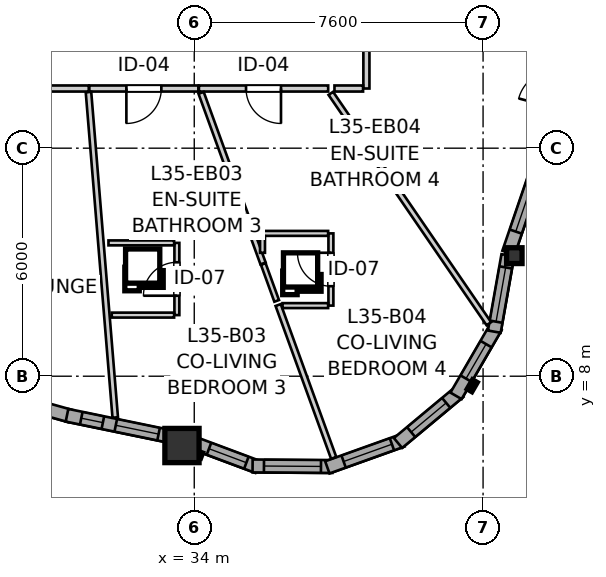
"""IFC4 building model, lengths in metres.
Left out: names, types, materials, properties, quantities, classifications, styles, units other than length and angle.
Written with IfcOpenShell. Run it as: python <this file> out.ifc"""

import sys

from ifc_helpers import new_model, si_unit, direction, frame, frame_2d, origin, origin_2d, place, context, subcontext, project, spatial, rectangle, i_section, extrude, source, transform, mapped, element, fill, save


model = new_model("IFC4")
c1 = context("Model", 3, precision=1e-05, world=origin(), true_north=direction((0.0, 1.0)))
c2 = subcontext(c1, "Body", "Model", "MODEL_VIEW")
j1 = project(units=[si_unit("LENGTHUNIT", "METRE"), si_unit("PLANEANGLEUNIT", "RADIAN")], contexts=[c1])
p1 = place(None, origin())
s1 = spatial("IfcSite", under=j1, at=p1, CompositionType="ELEMENT")
p2 = place(p1, origin())
s2 = spatial("IfcBuilding", under=s1, at=p2, CompositionType="ELEMENT")
p3 = place(p2, frame((0.0, 0.0, 118.4)))
s3 = spatial("IfcBuildingStorey", under=s2, at=p3, CompositionType="ELEMENT", Elevation=118.4)
m1 = source(origin(), c2, "Body", "SweptSolid", [
    extrude(rectangle(XDim=0.9, YDim=0.9, at=origin_2d()), origin(), (0.0, 0.0, 1.0), 2.95),
])
p4 = place(p3, frame((33.677, 6.176, 0.0), z_axis=(0.0, 0.0, 1.0), x_axis=(1.0, 0.0, 0.0)))
e1 = element("IfcColumn", 1, at=p4, inside=s3, PredefinedType="COLUMN", context=c2, shape_type="MappedRepresentation", body=[
    mapped(m1, transform((0.0, 0.0, 0.0), x_axis=(1.0, 0.0, 0.0), y_axis=(0.0, 1.0, 0.0), z_axis=(0.0, 0.0, 1.0), scale=1.0)),
])
m2 = source(origin(), c2, "Body", "SweptSolid", [
    extrude(i_section(OverallWidth=0.406, OverallDepth=0.416, WebThickness=0.027, FlangeThickness=0.044, FilletRadius=0.015, at=origin_2d()), origin(), (0.0, 0.0, 1.0), 2.95),
])
p5 = place(p3, frame((42.423, 11.172, 0.0), z_axis=(0.0, 0.0, 1.0), x_axis=(1.0, 0.0, 0.0)))
e2 = element("IfcColumn", 2, at=p5, inside=s3, PredefinedType="PILASTER", context=c2, shape_type="MappedRepresentation", body=[
    mapped(m2, transform((0.0, 0.0, 0.0), x_axis=(1.0, 0.0, 0.0), y_axis=(0.0, 1.0, 0.0), z_axis=(0.0, 0.0, 1.0), scale=1.0)),
])
p6 = place(p3, frame((27.811, 7.771, 0.0), z_axis=(0.0, 0.0, 1.0), x_axis=(0.963039905189, -0.269358758934, 0.0)))
e3 = element("IfcWall", 3, at=p6, inside=s3, PredefinedType="SOLIDWALL", context=c2, shape_type="SweptSolid", body=[
    extrude(rectangle(XDim=3.039, YDim=0.34, at=frame_2d((1.52, 0.0))), origin(), (0.0, 0.0, 1.0), 2.48),
])
p7 = place(p6, frame((0.935, 0.0, 0.82)))
e4 = element("IfcOpeningElement", 4, at=p7, cuts=e3, PredefinedType="OPENING", context=c2, shape_type="SweptSolid", body=[
    extrude(rectangle(XDim=1.15, YDim=1.2, at=frame_2d((0.575, 0.6))), frame((0.0, 0.18, 0.0), z_axis=(0.0, -1.0, 0.0), x_axis=(1.0, 0.0, 0.0)), (0.0, 0.0, 1.0), 0.36),
])
p8 = place(p3, frame((30.652, 6.973, 0.0), z_axis=(0.0, 0.0, 1.0), x_axis=(0.979418300652, -0.201841007595, 0.0)))
e5 = element("IfcWall", 5, at=p8, inside=s3, PredefinedType="SOLIDWALL", context=c2, shape_type="SweptSolid", body=[
    extrude(rectangle(XDim=2.893, YDim=0.34, at=frame_2d((1.447, 0.0))), origin(), (0.0, 0.0, 1.0), 2.48),
])
p9 = place(p8, frame((0.383, 0.0, 0.82)))
e6 = element("IfcOpeningElement", 6, at=p9, cuts=e5, PredefinedType="OPENING", context=c2, shape_type="SweptSolid", body=[
    extrude(rectangle(XDim=0.58, YDim=1.35, at=frame_2d((0.29, 0.675))), frame((0.0, 0.18, 0.0), z_axis=(0.0, -1.0, 0.0), x_axis=(1.0, 0.0, 0.0)), (0.0, 0.0, 1.0), 0.36),
])
p10 = place(p8, frame((1.31, 0.0, 0.82)))
e7 = element("IfcOpeningElement", 7, at=p10, cuts=e5, PredefinedType="OPENING", context=c2, shape_type="SweptSolid", body=[
    extrude(rectangle(XDim=1.15, YDim=1.2, at=frame_2d((0.575, 0.6))), frame((0.0, 0.18, 0.0), z_axis=(0.0, -1.0, 0.0), x_axis=(1.0, 0.0, 0.0)), (0.0, 0.0, 1.0), 0.36),
])
p11 = place(p3, frame((33.952, 6.255, 0.0), z_axis=(0.0, 0.0, 1.0), x_axis=(0.936799566991, -0.349866504951, 0.0)))
e8 = element("IfcWall", 8, at=p11, inside=s3, PredefinedType="SOLIDWALL", context=c2, shape_type="SweptSolid", body=[
    extrude(rectangle(XDim=1.831, YDim=0.34, at=frame_2d((0.916, 0.0))), origin(), (0.0, 0.0, 1.0), 2.48),
])
p12 = place(p11, frame((0.466, 0.0, 0.82)))
e9 = element("IfcOpeningElement", 9, at=p12, cuts=e8, PredefinedType="OPENING", context=c2, shape_type="SweptSolid", body=[
    extrude(rectangle(XDim=1.05, YDim=1.45, at=frame_2d((0.525, 0.725))), frame((0.0, 0.18, 0.0), z_axis=(0.0, -1.0, 0.0), x_axis=(1.0, 0.0, 0.0)), (0.0, 0.0, 1.0), 0.36),
])
p13 = place(p3, frame((35.535, 5.639, 0.0), z_axis=(0.0, 0.0, 1.0), x_axis=(0.999976456891, -0.00686189939, 0.0)))
e10 = element("IfcWall", 10, at=p13, inside=s3, PredefinedType="SOLIDWALL", context=c2, shape_type="SweptSolid", body=[
    extrude(rectangle(XDim=2.099, YDim=0.34, at=frame_2d((1.05, 0.0))), origin(), (0.0, 0.0, 1.0), 2.48),
])
p14 = place(p13, frame((0.3, 0.0, 0.82)))
e11 = element("IfcOpeningElement", 11, at=p14, cuts=e10, PredefinedType="OPENING", context=c2, shape_type="SweptSolid", body=[
    extrude(rectangle(XDim=1.5, YDim=1.45, at=frame_2d((0.75, 0.725))), frame((0.0, 0.18, 0.0), z_axis=(0.0, -1.0, 0.0), x_axis=(1.0, 0.0, 0.0)), (0.0, 0.0, 1.0), 0.36),
])
p15 = place(p3, frame((37.502, 5.602, 0.0), z_axis=(0.0, 0.0, 1.0), x_axis=(0.941523304278, 0.336947870598, 0.0)))
e12 = element("IfcWall", 12, at=p15, inside=s3, PredefinedType="SOLIDWALL", context=c2, shape_type="SweptSolid", body=[
    extrude(rectangle(XDim=2.099, YDim=0.34, at=frame_2d((1.05, 0.0))), origin(), (0.0, 0.0, 1.0), 2.48),
])
p16 = place(p15, frame((0.455, 0.0, 0.82)))
e13 = element("IfcOpeningElement", 13, at=p16, cuts=e12, PredefinedType="OPENING", context=c2, shape_type="SweptSolid", body=[
    extrude(rectangle(XDim=1.35, YDim=1.45, at=frame_2d((0.675, 0.725))), frame((0.0, 0.18, 0.0), z_axis=(0.0, -1.0, 0.0), x_axis=(1.0, 0.0, 0.0)), (0.0, 0.0, 1.0), 0.36),
])
p17 = place(p3, frame((39.362, 6.242, 0.0), z_axis=(0.0, 0.0, 1.0), x_axis=(0.768440501876, 0.639921241308, 0.0)))
e14 = element("IfcWall", 14, at=p17, inside=s3, PredefinedType="SOLIDWALL", context=c2, shape_type="SweptSolid", body=[
    extrude(rectangle(XDim=2.099, YDim=0.34, at=frame_2d((1.05, 0.0))), origin(), (0.0, 0.0, 1.0), 2.48),
])
p18 = place(p17, frame((0.449, 0.0, 0.82)))
e15 = element("IfcOpeningElement", 15, at=p18, cuts=e14, PredefinedType="OPENING", context=c2, shape_type="SweptSolid", body=[
    extrude(rectangle(XDim=1.2, YDim=1.45, at=frame_2d((0.6, 0.725))), frame((0.0, 0.18, 0.0), z_axis=(0.0, -1.0, 0.0), x_axis=(1.0, 0.0, 0.0)), (0.0, 0.0, 1.0), 0.36),
])
p19 = place(p3, frame((40.888, 7.483, 0.0), z_axis=(0.0, 0.0, 1.0), x_axis=(0.501902596059, 0.864924149315, 0.0)))
e16 = element("IfcWall", 16, at=p19, inside=s3, PredefinedType="SOLIDWALL", context=c2, shape_type="SweptSolid", body=[
    extrude(rectangle(XDim=2.099, YDim=0.34, at=frame_2d((1.049, 0.0))), origin(), (0.0, 0.0, 1.0), 2.48),
])
p20 = place(p19, frame((0.524, 0.0, 0.82)))
e17 = element("IfcOpeningElement", 17, at=p20, cuts=e16, PredefinedType="OPENING", context=c2, shape_type="SweptSolid", body=[
    extrude(rectangle(XDim=1.05, YDim=1.45, at=frame_2d((0.525, 0.725))), frame((0.0, 0.18, 0.0), z_axis=(0.0, -1.0, 0.0), x_axis=(1.0, 0.0, 0.0)), (0.0, 0.0, 1.0), 0.36),
])
p21 = place(p3, frame((41.896, 9.173, 0.0), z_axis=(0.0, 0.0, 1.0), x_axis=(0.174399433509, 0.984674990843, 0.0)))
e18 = element("IfcWall", 18, at=p21, inside=s3, PredefinedType="SOLIDWALL", context=c2, shape_type="SweptSolid", body=[
    extrude(rectangle(XDim=2.041, YDim=0.34, at=frame_2d((1.021, 0.0))), origin(), (0.0, 0.0, 1.0), 2.48),
])
p22 = place(p21, frame((0.267, 0.0, 0.82)))
e19 = element("IfcOpeningElement", 19, at=p22, cuts=e18, PredefinedType="OPENING", context=c2, shape_type="SweptSolid", body=[
    extrude(rectangle(XDim=1.45, YDim=1.25, at=frame_2d((0.725, 0.625))), frame((0.0, 0.18, 0.0), z_axis=(0.0, -1.0, 0.0), x_axis=(1.0, 0.0, 0.0)), (0.0, 0.0, 1.0), 0.36),
])
p23 = place(p3, frame((42.268, 11.246, 0.0), z_axis=(0.0, 0.0, 1.0), x_axis=(0.323583674973, 0.946199558915, 0.0)))
e20 = element("IfcWall", 20, at=p23, inside=s3, PredefinedType="SOLIDWALL", context=c2, shape_type="SweptSolid", body=[
    extrude(rectangle(XDim=3.152, YDim=0.34, at=frame_2d((1.576, 0.0))), origin(), (0.0, 0.0, 1.0), 2.48),
])
p24 = place(p23, frame((0.591, 0.0, 0.82)))
e21 = element("IfcOpeningElement", 21, at=p24, cuts=e20, PredefinedType="OPENING", context=c2, shape_type="SweptSolid", body=[
    extrude(rectangle(XDim=1.95, YDim=1.4, at=frame_2d((0.975, 0.7))), frame((0.0, 0.18, 0.0), z_axis=(0.0, -1.0, 0.0), x_axis=(1.0, 0.0, 0.0)), (0.0, 0.0, 1.0), 0.36),
])
p25 = place(p3, frame((38.53, 21.321, 0.0), z_axis=(0.0, 0.0, 1.0), x_axis=(0.0, -1.0, 0.0)))
e22 = element("IfcWall", 22, at=p25, inside=s3, PredefinedType="PARTITIONING", context=c2, shape_type="SweptSolid", body=[
    extrude(rectangle(XDim=5.751, YDim=0.16, at=frame_2d((2.875, 0.0))), origin(), (0.0, 0.0, 1.0), 2.95),
])
p26 = place(p25, frame((2.404, 0.0, 0.0)))
e23 = element("IfcOpeningElement", 23, at=p26, cuts=e22, PredefinedType="OPENING", context=c2, shape_type="SweptSolid", body=[
    extrude(rectangle(XDim=0.96, YDim=2.1, at=frame_2d((0.48, 1.05))), frame((0.0, 0.09, 0.0), z_axis=(0.0, -1.0, 0.0), x_axis=(1.0, 0.0, 0.0)), (0.0, 0.0, 1.0), 0.18),
])
p27 = place(p3, frame((31.224, 15.57, 0.0), z_axis=(0.0, 0.0, 1.0), x_axis=(-1.0, 0.0, 0.0)))
e24 = element("IfcWall", 24, at=p27, inside=s3, PredefinedType="PARTITIONING", context=c2, shape_type="SweptSolid", body=[
    extrude(rectangle(XDim=3.679, YDim=0.16, at=frame_2d((1.84, 0.0))), origin(), (0.0, 0.0, 1.0), 2.95),
])
p28 = place(p27, frame((1.212, 0.0, 0.0)))
e25 = element("IfcOpeningElement", 25, at=p28, cuts=e24, PredefinedType="OPENING", context=c2, shape_type="SweptSolid", body=[
    extrude(rectangle(XDim=1.3, YDim=2.1, at=frame_2d((0.65, 1.05))), frame((0.0, 0.09, 0.0), z_axis=(0.0, -1.0, 0.0), x_axis=(1.0, 0.0, 0.0)), (0.0, 0.0, 1.0), 0.18),
])
p29 = place(p3, frame((37.524, 15.57, 0.0), z_axis=(0.0, 0.0, 1.0), x_axis=(-1.0, 0.0, 0.0)))
e26 = element("IfcWall", 26, at=p29, inside=s3, PredefinedType="PARTITIONING", context=c2, shape_type="SweptSolid", body=[
    extrude(rectangle(XDim=3.401, YDim=0.16, at=frame_2d((1.7, 0.0))), origin(), (0.0, 0.0, 1.0), 2.95),
])
p30 = place(p29, frame((1.241, 0.0, 0.0)))
e27 = element("IfcOpeningElement", 27, at=p30, cuts=e26, PredefinedType="OPENING", context=c2, shape_type="SweptSolid", body=[
    extrude(rectangle(XDim=0.92, YDim=2.1, at=frame_2d((0.46, 1.05))), frame((0.0, 0.09, 0.0), z_axis=(0.0, -1.0, 0.0), x_axis=(1.0, 0.0, 0.0)), (0.0, 0.0, 1.0), 0.18),
])
p31 = place(p3, frame((34.108, 15.57, 0.0), z_axis=(0.0, 0.0, 1.0), x_axis=(-1.0, 0.0, 0.0)))
e28 = element("IfcWall", 28, at=p31, inside=s3, PredefinedType="PARTITIONING", context=c2, shape_type="SweptSolid", body=[
    extrude(rectangle(XDim=2.869, YDim=0.16, at=frame_2d((1.435, 0.0))), origin(), (0.0, 0.0, 1.0), 2.95),
])
p32 = place(p31, frame((0.974, 0.0, 0.0)))
e29 = element("IfcOpeningElement", 29, at=p32, cuts=e28, PredefinedType="OPENING", context=c2, shape_type="SweptSolid", body=[
    extrude(rectangle(XDim=0.92, YDim=2.1, at=frame_2d((0.46, 1.05))), frame((0.0, 0.09, 0.0), z_axis=(0.0, -1.0, 0.0), x_axis=(1.0, 0.0, 0.0)), (0.0, 0.0, 1.0), 0.18),
])
p33 = place(p3, frame((33.543, 9.608, 0.0), z_axis=(0.0, 0.0, 1.0), x_axis=(0.0, 1.0, 0.0)))
e30 = element("IfcWall", 30, at=p33, inside=s3, PredefinedType="PARTITIONING", context=c2, shape_type="SweptSolid", body=[
    extrude(rectangle(XDim=1.9, YDim=0.13, at=frame_2d((0.95, 0.0))), origin(), (0.0, 0.0, 1.0), 2.95),
])
p34 = place(p33, frame((0.51, 0.0, 0.0)))
e31 = element("IfcOpeningElement", 31, at=p34, cuts=e30, PredefinedType="OPENING", context=c2, shape_type="SweptSolid", body=[
    extrude(rectangle(XDim=0.88, YDim=2.05, at=frame_2d((0.44, 1.025))), frame((0.0, 0.075, 0.0), z_axis=(0.0, -1.0, 0.0), x_axis=(1.0, 0.0, 0.0)), (0.0, 0.0, 1.0), 0.15),
])
p35 = place(p3, frame((37.596, 9.858, 0.0), z_axis=(0.0, 0.0, 1.0), x_axis=(0.0, 1.0, 0.0)))
e32 = element("IfcWall", 32, at=p35, inside=s3, PredefinedType="PARTITIONING", context=c2, shape_type="SweptSolid", body=[
    extrude(rectangle(XDim=1.9, YDim=0.13, at=frame_2d((0.95, 0.0))), origin(), (0.0, 0.0, 1.0), 2.95),
])
p36 = place(p35, frame((0.51, 0.0, 0.0)))
e33 = element("IfcOpeningElement", 33, at=p36, cuts=e32, PredefinedType="OPENING", context=c2, shape_type="SweptSolid", body=[
    extrude(rectangle(XDim=0.88, YDim=2.05, at=frame_2d((0.44, 1.025))), frame((0.0, 0.075, 0.0), z_axis=(0.0, -1.0, 0.0), x_axis=(1.0, 0.0, 0.0)), (0.0, 0.0, 1.0), 0.15),
])
p37 = place(p3, frame((31.217, 15.476, 0.0), z_axis=(0.0, 0.0, 1.0), x_axis=(0.081928316893, -0.996638224679, 0.0)))
e34 = element("IfcWall", 34, at=p37, inside=s3, PredefinedType="PARTITIONING", context=c2, shape_type="SweptSolid", body=[
    extrude(rectangle(XDim=8.591, YDim=0.145, at=frame_2d((4.295, 0.0))), origin(), (0.0, 0.0, 1.0), 2.95),
])
p38 = place(p3, frame((37.594, 15.442, 0.0), z_axis=(0.0, 0.0, 1.0), x_axis=(0.565681325722, -0.824623937155, 0.0)))
e35 = element("IfcWall", 35, at=p38, inside=s3, PredefinedType="PARTITIONING", context=c2, shape_type="SweptSolid", body=[
    extrude(rectangle(XDim=7.35, YDim=0.145, at=frame_2d((3.675, 0.0))), origin(), (0.0, 0.0, 1.0), 2.95),
])
p39 = place(p3, frame((34.18, 15.458, 0.0), z_axis=(0.0, 0.0, 1.0), x_axis=(0.341373856507, -0.939927598325, 0.0)))
e36 = element("IfcWall", 36, at=p39, inside=s3, PredefinedType="PARTITIONING", context=c2, shape_type="SweptSolid", body=[
    extrude(rectangle(XDim=4.779, YDim=0.145, at=frame_2d((2.389, 0.0))), origin(), (0.0, 0.0, 1.0), 2.95),
])
p40 = place(p3, frame((36.208, 9.873, 0.0), z_axis=(0.0, 0.0, 1.0), x_axis=(0.341362804218, -0.939931612351, 0.0)))
e37 = element("IfcWall", 37, at=p40, inside=s3, PredefinedType="PARTITIONING", context=c2, shape_type="SweptSolid", body=[
    extrude(rectangle(XDim=4.279, YDim=0.145, at=frame_2d((2.14, 0.0))), origin(), (0.0, 0.0, 1.0), 2.95),
])
p41 = place(p3, frame((31.743, 11.508, 0.0), z_axis=(0.0, 0.0, 1.0), x_axis=(1.0, 0.0, 0.0)))
e38 = element("IfcWall", 38, at=p41, inside=s3, PredefinedType="PARTITIONING", context=c2, shape_type="SweptSolid", body=[
    extrude(rectangle(XDim=1.727, YDim=0.13, at=frame_2d((0.864, 0.0))), origin(), (0.0, 0.0, 1.0), 2.95),
])
p42 = place(p3, frame((31.829, 9.608, 0.0), z_axis=(0.0, 0.0, 1.0), x_axis=(1.0, 0.0, 0.0)))
e39 = element("IfcWall", 39, at=p42, inside=s3, PredefinedType="PARTITIONING", context=c2, shape_type="SweptSolid", body=[
    extrude(rectangle(XDim=1.641, YDim=0.13, at=frame_2d((0.82, 0.0))), origin(), (0.0, 0.0, 1.0), 2.558),
])
p43 = place(p3, frame((35.796, 11.758, 0.0), z_axis=(0.0, 0.0, 1.0), x_axis=(1.0, 0.0, 0.0)))
e40 = element("IfcWall", 40, at=p43, inside=s3, PredefinedType="PARTITIONING", context=c2, shape_type="SweptSolid", body=[
    extrude(rectangle(XDim=1.727, YDim=0.13, at=frame_2d((0.864, 0.0))), origin(), (0.0, 0.0, 1.0), 2.95),
])
p44 = place(p3, frame((36.323, 9.858, 0.0), z_axis=(0.0, 0.0, 1.0), x_axis=(1.0, 0.0, 0.0)))
e41 = element("IfcWall", 41, at=p44, inside=s3, PredefinedType="PARTITIONING", context=c2, shape_type="SweptSolid", body=[
    extrude(rectangle(XDim=1.2, YDim=0.13, at=frame_2d((0.6, 0.0))), origin(), (0.0, 0.0, 1.0), 2.95),
])
p45 = place(p3, frame((35.816, 10.952, 0.0), z_axis=(0.0, 0.0, 1.0), x_axis=(0.341515178303, -0.939876259403, 0.0)))
e42 = element("IfcWall", 42, at=p45, inside=s3, PredefinedType="PARTITIONING", context=c2, shape_type="SweptSolid", body=[
    extrude(rectangle(XDim=1.032, YDim=0.13, at=frame_2d((0.516, 0.0))), origin(), (0.0, 0.0, 1.0), 2.95),
])
p46 = place(p3, frame((37.69, 15.57, 0.0), z_axis=(0.0, 0.0, 1.0), x_axis=(1.0, 0.0, 0.0)))
e43 = element("IfcWall", 43, at=p46, inside=s3, PredefinedType="PARTITIONING", context=c2, shape_type="SweptSolid", body=[
    extrude(rectangle(XDim=0.752, YDim=0.16, at=frame_2d((0.376, 0.0))), origin(), (0.0, 0.0, 1.0), 2.95),
])
p47 = place(p3, frame((35.796, 11.247, 0.0), z_axis=(0.0, 0.0, 1.0), x_axis=(0.0, 1.0, 0.0)))
e44 = element("IfcWall", 44, at=p47, inside=s3, PredefinedType="PARTITIONING", context=c2, shape_type="SweptSolid", body=[
    extrude(rectangle(XDim=0.438, YDim=0.13, at=frame_2d((0.219, 0.0))), origin(), (0.0, 0.0, 1.0), 2.95),
])
m3 = source(origin(), c2, "Body", "SweptSolid", [
    extrude(rectangle(XDim=0.58, YDim=1.35, at=frame_2d((0.29, 0.675))), frame((0.0, 0.03, 0.0), z_axis=(0.0, -1.0, 0.0), x_axis=(1.0, 0.0, 0.0)), (0.0, 0.0, 1.0), 0.06),
])
p48 = place(p9, origin())
e45 = element("IfcWindow", 45, at=p48, inside=s3, PartitioningType="SINGLE_PANEL", PredefinedType="WINDOW", context=c2, shape_type="MappedRepresentation", body=[
    mapped(m3, transform((0.0, 0.0, 0.0), x_axis=(1.0, 0.0, 0.0), y_axis=(0.0, 1.0, 0.0), z_axis=(0.0, 0.0, 1.0), scale=1.0)),
])
fill(e6, e45)
m4 = source(origin(), c2, "Body", "SweptSolid", [
    extrude(rectangle(XDim=1.15, YDim=1.2, at=frame_2d((0.575, 0.6))), frame((0.0, 0.03, 0.0), z_axis=(0.0, -1.0, 0.0), x_axis=(1.0, 0.0, 0.0)), (0.0, 0.0, 1.0), 0.06),
])
p49 = place(p10, origin())
e46 = element("IfcWindow", 46, at=p49, inside=s3, PartitioningType="SINGLE_PANEL", PredefinedType="WINDOW", context=c2, shape_type="MappedRepresentation", body=[
    mapped(m4, transform((0.0, 0.0, 0.0), x_axis=(1.0, 0.0, 0.0), y_axis=(0.0, 1.0, 0.0), z_axis=(0.0, 0.0, 1.0), scale=1.0)),
])
fill(e7, e46)
m5 = source(origin(), c2, "Body", "SweptSolid", [
    extrude(rectangle(XDim=1.05, YDim=1.45, at=frame_2d((0.525, 0.725))), frame((0.0, 0.03, 0.0), z_axis=(0.0, -1.0, 0.0), x_axis=(1.0, 0.0, 0.0)), (0.0, 0.0, 1.0), 0.06),
])
p50 = place(p12, origin())
e47 = element("IfcWindow", 47, at=p50, inside=s3, PartitioningType="SINGLE_PANEL", PredefinedType="WINDOW", context=c2, shape_type="MappedRepresentation", body=[
    mapped(m5, transform((0.0, 0.0, 0.0), x_axis=(1.0, 0.0, 0.0), y_axis=(0.0, 1.0, 0.0), z_axis=(0.0, 0.0, 1.0), scale=1.0)),
])
fill(e9, e47)
m6 = source(origin(), c2, "Body", "SweptSolid", [
    extrude(rectangle(XDim=1.5, YDim=1.45, at=frame_2d((0.75, 0.725))), frame((0.0, 0.03, 0.0), z_axis=(0.0, -1.0, 0.0), x_axis=(1.0, 0.0, 0.0)), (0.0, 0.0, 1.0), 0.06),
])
p51 = place(p14, origin())
e48 = element("IfcWindow", 48, at=p51, inside=s3, PartitioningType="SINGLE_PANEL", PredefinedType="WINDOW", context=c2, shape_type="MappedRepresentation", body=[
    mapped(m6, transform((0.0, 0.0, 0.0), x_axis=(1.0, 0.0, 0.0), y_axis=(0.0, 1.0, 0.0), z_axis=(0.0, 0.0, 1.0), scale=1.0)),
])
fill(e11, e48)
m7 = source(origin(), c2, "Body", "SweptSolid", [
    extrude(rectangle(XDim=1.35, YDim=1.45, at=frame_2d((0.675, 0.725))), frame((0.0, 0.03, 0.0), z_axis=(0.0, -1.0, 0.0), x_axis=(1.0, 0.0, 0.0)), (0.0, 0.0, 1.0), 0.06),
])
p52 = place(p16, origin())
e49 = element("IfcWindow", 49, at=p52, inside=s3, PartitioningType="SINGLE_PANEL", PredefinedType="WINDOW", context=c2, shape_type="MappedRepresentation", body=[
    mapped(m7, transform((0.0, 0.0, 0.0), x_axis=(1.0, 0.0, 0.0), y_axis=(0.0, 1.0, 0.0), z_axis=(0.0, 0.0, 1.0), scale=1.0)),
])
fill(e13, e49)
m8 = source(origin(), c2, "Body", "SweptSolid", [
    extrude(rectangle(XDim=1.2, YDim=1.45, at=frame_2d((0.6, 0.725))), frame((0.0, 0.03, 0.0), z_axis=(0.0, -1.0, 0.0), x_axis=(1.0, 0.0, 0.0)), (0.0, 0.0, 1.0), 0.06),
])
p53 = place(p18, origin())
e50 = element("IfcWindow", 50, at=p53, inside=s3, PartitioningType="SINGLE_PANEL", PredefinedType="WINDOW", context=c2, shape_type="MappedRepresentation", body=[
    mapped(m8, transform((0.0, 0.0, 0.0), x_axis=(1.0, 0.0, 0.0), y_axis=(0.0, 1.0, 0.0), z_axis=(0.0, 0.0, 1.0), scale=1.0)),
])
fill(e15, e50)
p54 = place(p20, origin())
e51 = element("IfcWindow", 51, at=p54, inside=s3, PartitioningType="SINGLE_PANEL", PredefinedType="WINDOW", context=c2, shape_type="MappedRepresentation", body=[
    mapped(m5, transform((0.0, 0.0, 0.0), x_axis=(1.0, 0.0, 0.0), y_axis=(0.0, 1.0, 0.0), z_axis=(0.0, 0.0, 1.0), scale=1.0)),
])
fill(e17, e51)
m9 = source(origin(), c2, "Body", "SweptSolid", [
    extrude(rectangle(XDim=1.45, YDim=1.25, at=frame_2d((0.725, 0.625))), frame((0.0, 0.03, 0.0), z_axis=(0.0, -1.0, 0.0), x_axis=(1.0, 0.0, 0.0)), (0.0, 0.0, 1.0), 0.06),
])
p55 = place(p22, origin())
e52 = element("IfcWindow", 52, at=p55, inside=s3, PartitioningType="SINGLE_PANEL", PredefinedType="WINDOW", context=c2, shape_type="MappedRepresentation", body=[
    mapped(m9, transform((0.0, 0.0, 0.0), x_axis=(1.0, 0.0, 0.0), y_axis=(0.0, 1.0, 0.0), z_axis=(0.0, 0.0, 1.0), scale=1.0)),
])
fill(e19, e52)
m10 = source(origin(), c2, "Body", "SweptSolid", [
    extrude(rectangle(XDim=1.95, YDim=1.4, at=frame_2d((0.975, 0.7))), frame((0.0, 0.03, 0.0), z_axis=(0.0, -1.0, 0.0), x_axis=(1.0, 0.0, 0.0)), (0.0, 0.0, 1.0), 0.06),
])
p56 = place(p24, origin())
e53 = element("IfcWindow", 53, at=p56, inside=s3, PartitioningType="SINGLE_PANEL", PredefinedType="WINDOW", context=c2, shape_type="MappedRepresentation", body=[
    mapped(m10, transform((0.0, 0.0, 0.0), x_axis=(1.0, 0.0, 0.0), y_axis=(0.0, 1.0, 0.0), z_axis=(0.0, 0.0, 1.0), scale=1.0)),
])
fill(e21, e53)
m11 = source(origin(), c2, "Body", "SweptSolid", [
    extrude(rectangle(XDim=0.92, YDim=2.1, at=frame_2d((0.46, 1.05))), frame((0.0, 0.025, 0.0), z_axis=(0.0, -1.0, 0.0), x_axis=(1.0, 0.0, 0.0)), (0.0, 0.0, 1.0), 0.05),
])
p57 = place(p30, origin())
e54 = element("IfcDoor", 54, at=p57, inside=s3, OperationType="SINGLE_SWING_LEFT", PredefinedType="DOOR", context=c2, shape_type="MappedRepresentation", body=[
    mapped(m11, transform((0.0, 0.0, 0.0), x_axis=(1.0, 0.0, 0.0), y_axis=(0.0, 1.0, 0.0), z_axis=(0.0, 0.0, 1.0), scale=1.0)),
])
fill(e27, e54)
p58 = place(p32, origin())
e55 = element("IfcDoor", 55, at=p58, inside=s3, OperationType="SINGLE_SWING_RIGHT", PredefinedType="DOOR", context=c2, shape_type="MappedRepresentation", body=[
    mapped(m11, transform((0.0, 0.0, 0.0), x_axis=(1.0, 0.0, 0.0), y_axis=(0.0, 1.0, 0.0), z_axis=(0.0, 0.0, 1.0), scale=1.0)),
])
fill(e29, e55)
m12 = source(origin(), c2, "Body", "SweptSolid", [
    extrude(rectangle(XDim=0.88, YDim=2.05, at=frame_2d((0.44, 1.025))), frame((0.0, 0.025, 0.0), z_axis=(0.0, -1.0, 0.0), x_axis=(1.0, 0.0, 0.0)), (0.0, 0.0, 1.0), 0.05),
])
p59 = place(p34, origin())
e56 = element("IfcDoor", 56, at=p59, inside=s3, OperationType="SINGLE_SWING_LEFT", PredefinedType="DOOR", context=c2, shape_type="MappedRepresentation", body=[
    mapped(m12, transform((0.0, 0.0, 0.0), x_axis=(1.0, 0.0, 0.0), y_axis=(0.0, 1.0, 0.0), z_axis=(0.0, 0.0, 1.0), scale=1.0)),
])
fill(e31, e56)
p60 = place(p36, origin())
e57 = element("IfcDoor", 57, at=p60, inside=s3, OperationType="SINGLE_SWING_RIGHT", PredefinedType="DOOR", context=c2, shape_type="MappedRepresentation", body=[
    mapped(m12, transform((0.0, 0.0, 0.0), x_axis=(1.0, 0.0, 0.0), y_axis=(0.0, 1.0, 0.0), z_axis=(0.0, 0.0, 1.0), scale=1.0)),
])
fill(e33, e57)
save(model, sys.argv[1])
